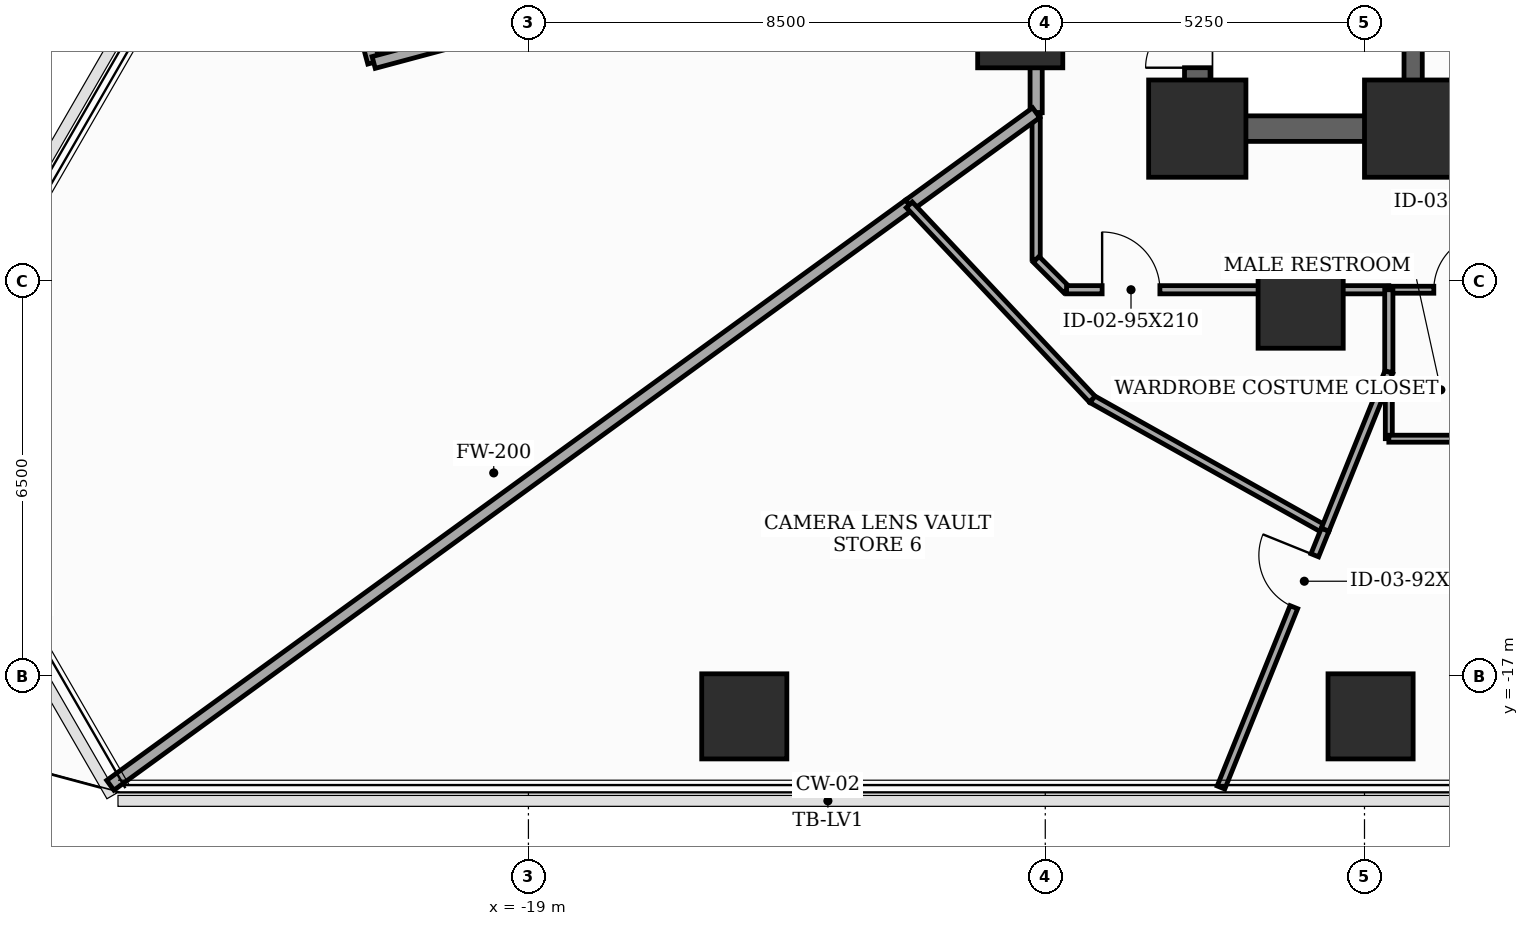
"""IFC4 building model, lengths in metres.
Left out: names, types, materials, properties, quantities, classifications, styles, units other than length and angle.
Written with IfcOpenShell. Run it as: python <this file> out.ifc"""

import sys

from ifc_helpers import new_model, si_unit, direction, frame, frame_2d, origin, origin_2d, place, context, subcontext, project, spatial, rectangle, extrude, element, fill, save


model = new_model("IFC4")
c1 = context("Model", 3, precision=1e-05, world=origin(), true_north=direction((0.0, 1.0)))
c2 = subcontext(c1, "Body", "Model", "MODEL_VIEW")
j1 = project(units=[si_unit("LENGTHUNIT", "METRE"), si_unit("PLANEANGLEUNIT", "RADIAN")], contexts=[c1])
p1 = place(None, origin())
s1 = spatial("IfcSite", under=j1, at=p1, CompositionType="ELEMENT")
p2 = place(p1, origin())
s2 = spatial("IfcBuilding", under=s1, at=p2, CompositionType="ELEMENT")
p3 = place(p2, frame((0.0, 0.0, 44.5)))
s3 = spatial("IfcBuildingStorey", under=s2, at=p3, CompositionType="ELEMENT", Elevation=44.5)
for number, where, z_axis, x_axis in (
    (1, (-8.0, -8.0, 0.0), (0.0, 0.0, 1.0), (1.0, 0.0, 0.0)),
    (2, (-4.45, -8.0, 0.0), (0.0, 0.0, 1.0), (1.0, 0.0, 0.0)),
):
    element("IfcColumn", number, at=place(p3, frame(where, z_axis=z_axis, x_axis=x_axis)), inside=s3, PredefinedType="COLUMN", context=c2, shape_type="SweptSolid", body=[
        extrude(rectangle(XDim=1.6, YDim=1.6, at=origin_2d()), origin(), (0.0, 0.0, 1.0), 3.7),
    ])
for number, where, z_axis, x_axis in (
    (3, (-10.912, -6.3, 0.0), (0.0, 0.0, 1.0), (1.0, 0.0, 0.0)),
    (4, (-6.3, -10.912, 0.0), (0.0, 0.0, 1.0), (1.0, 0.0, 0.0)),
    (5, (-15.45, -17.667, 0.0), (0.0, 0.0, 1.0), (1.0, 0.0, 0.0)),
    (6, (-5.15, -17.667, 0.0), (0.0, 0.0, 1.0), (1.0, 0.0, 0.0)),
):
    element("IfcColumn", number, at=place(p3, frame(where, z_axis=z_axis, x_axis=x_axis)), inside=s3, PredefinedType="COLUMN", context=c2, shape_type="SweptSolid", body=[
        extrude(rectangle(XDim=1.4, YDim=1.4, at=origin_2d()), origin(), (0.0, 0.0, 1.0), 3.7),
    ])
p4 = place(p3, frame((-8.0, -8.0, 0.0), z_axis=(0.0, 0.0, 1.0), x_axis=(0.0, 1.0, 0.0)))
e7 = element("IfcWall", 7, at=p4, inside=s3, PredefinedType="SHEAR", context=c2, shape_type="SweptSolid", body=[
    extrude(rectangle(XDim=16.0, YDim=0.42, at=frame_2d((8.0, 0.0))), origin(), (0.0, 0.0, 1.0), 3.5),
])
p5 = place(p4, frame((1.002, 0.0, 0.0)))
e8 = element("IfcOpeningElement", 8, at=p5, cuts=e7, PredefinedType="OPENING", context=c2, shape_type="SweptSolid", body=[
    extrude(rectangle(XDim=0.85, YDim=2.02, at=frame_2d((0.425, 1.01))), frame((0.0, 0.22, 0.0), z_axis=(0.0, -1.0, 0.0), x_axis=(1.0, 0.0, 0.0)), (0.0, 0.0, 1.0), 0.44),
])
p6 = place(p4, frame((5.35, 0.0, 0.0)))
e9 = element("IfcOpeningElement", 9, at=p6, cuts=e7, PredefinedType="OPENING", context=c2, shape_type="SweptSolid", body=[
    extrude(rectangle(XDim=1.05, YDim=2.15, at=frame_2d((0.525, 1.075))), frame((0.0, 0.22, 0.0), z_axis=(0.0, -1.0, 0.0), x_axis=(1.0, 0.0, 0.0)), (0.0, 0.0, 1.0), 0.44),
])
p7 = place(p3, frame((-8.0, -8.0, 0.0), z_axis=(0.0, 0.0, 1.0), x_axis=(1.0, 0.0, 0.0)))
e10 = element("IfcWall", 10, at=p7, inside=s3, PredefinedType="SHEAR", context=c2, shape_type="SweptSolid", body=[
    extrude(rectangle(XDim=16.0, YDim=0.42, at=frame_2d((8.0, 0.0))), origin(), (0.0, 0.0, 1.0), 3.5),
])
p8 = place(p7, frame((4.6, 0.0, 0.0)))
e11 = element("IfcOpeningElement", 11, at=p8, cuts=e10, PredefinedType="OPENING", context=c2, shape_type="SweptSolid", body=[
    extrude(rectangle(XDim=0.95, YDim=2.1, at=frame_2d((0.475, 1.05))), frame((0.0, 0.22, 0.0), z_axis=(0.0, -1.0, 0.0), x_axis=(1.0, 0.0, 0.0)), (0.0, 0.0, 1.0), 0.44),
])
p9 = place(p7, frame((7.52, 0.0, 0.0)))
e12 = element("IfcOpeningElement", 12, at=p9, cuts=e10, PredefinedType="OPENING", context=c2, shape_type="SweptSolid", body=[
    extrude(rectangle(XDim=0.95, YDim=2.1, at=frame_2d((0.475, 1.05))), frame((0.0, 0.22, 0.0), z_axis=(0.0, -1.0, 0.0), x_axis=(1.0, 0.0, 0.0)), (0.0, 0.0, 1.0), 0.44),
])
p10 = place(p7, frame((10.45, 0.0, 0.0)))
e13 = element("IfcOpeningElement", 13, at=p10, cuts=e10, PredefinedType="OPENING", context=c2, shape_type="SweptSolid", body=[
    extrude(rectangle(XDim=0.95, YDim=2.1, at=frame_2d((0.475, 1.05))), frame((0.0, 0.22, 0.0), z_axis=(0.0, -1.0, 0.0), x_axis=(1.0, 0.0, 0.0)), (0.0, 0.0, 1.0), 0.44),
])
p11 = place(p3, frame((-4.45, -7.79, 0.0), z_axis=(0.0, 0.0, 1.0), x_axis=(0.0, 1.0, 0.0)))
e14 = element("IfcWall", 14, at=p11, inside=s3, PredefinedType="SHEAR", context=c2, shape_type="SweptSolid", body=[
    extrude(rectangle(XDim=15.58, YDim=0.3, at=frame_2d((7.79, 0.0))), origin(), (0.0, 0.0, 1.0), 3.5),
])
p12 = place(p3, frame((-22.115, -4.787, 0.0), z_axis=(0.0, 0.0, 1.0), x_axis=(0.259105843213, -0.965848933329, 0.0)))
e15 = element("IfcWall", 15, at=p12, inside=s3, PredefinedType="SOLIDWALL", context=c2, shape_type="SweptSolid", body=[
    extrude(rectangle(XDim=2.2, YDim=0.2, at=frame_2d((1.1, 0.0))), origin(), (0.0, 0.0, 1.0), 2.935),
])
p13 = place(p3, frame((-21.545, -6.912, 0.0), z_axis=(0.0, 0.0, 1.0), x_axis=(0.965906888357, 0.258889712088, 0.0)))
e16 = element("IfcWall", 16, at=p13, inside=s3, PredefinedType="SOLIDWALL", context=c2, shape_type="SweptSolid", body=[
    extrude(rectangle(XDim=11.28, YDim=0.2, at=frame_2d((5.64, 0.0))), origin(), (0.0, 0.0, 1.0), 2.785),
])
p14 = place(p3, frame((-10.65, -3.992, 0.0), z_axis=(0.0, 0.0, 1.0), x_axis=(0.0, -1.0, 0.0)))
e17 = element("IfcWall", 17, at=p14, inside=s3, PredefinedType="SOLIDWALL", context=c2, shape_type="SweptSolid", body=[
    extrude(rectangle(XDim=3.746, YDim=0.2, at=frame_2d((1.873, 0.0))), origin(), (0.0, 0.0, 1.0), 2.785),
])
p15 = place(p3, frame((-10.65, -7.738, 0.0), z_axis=(0.0, 0.0, 1.0), x_axis=(0.0, -1.0, 0.0)))
e18 = element("IfcWall", 18, at=p15, inside=s3, PredefinedType="PARTITIONING", context=c2, shape_type="SweptSolid", body=[
    extrude(rectangle(XDim=2.412, YDim=0.135, at=frame_2d((1.206, 0.0))), origin(), (0.0, 0.0, 1.0), 3.5),
])
p16 = place(p3, frame((-10.65, -10.15, 0.0), z_axis=(0.0, 0.0, 1.0), x_axis=(0.707106781187, -0.707106781187, 0.0)))
e19 = element("IfcWall", 19, at=p16, inside=s3, PredefinedType="PARTITIONING", context=c2, shape_type="SweptSolid", body=[
    extrude(rectangle(XDim=0.707, YDim=0.135, at=frame_2d((0.354, 0.0))), origin(), (0.0, 0.0, 1.0), 3.5),
])
p17 = place(p3, frame((-10.15, -10.65, 0.0), z_axis=(0.0, 0.0, 1.0), x_axis=(1.0, 0.0, 0.0)))
e20 = element("IfcWall", 20, at=p17, inside=s3, PredefinedType="PARTITIONING", context=c2, shape_type="SweptSolid", body=[
    extrude(rectangle(XDim=5.3, YDim=0.135, at=frame_2d((2.65, 0.0))), origin(), (0.0, 0.0, 1.0), 2.785),
])
p18 = place(p17, frame((0.585, 0.0, 0.0)))
e21 = element("IfcOpeningElement", 21, at=p18, cuts=e20, PredefinedType="OPENING", context=c2, shape_type="SweptSolid", body=[
    extrude(rectangle(XDim=0.95, YDim=2.1, at=frame_2d((0.475, 1.05))), frame((0.0, 0.077, 0.0), z_axis=(0.0, -1.0, 0.0), x_axis=(1.0, 0.0, 0.0)), (0.0, 0.0, 1.0), 0.155),
])
p19 = place(p3, frame((-4.85, -10.65, 0.0), z_axis=(0.0, 0.0, 1.0), x_axis=(1.0, 0.0, 0.0)))
e22 = element("IfcWall", 22, at=p19, inside=s3, PredefinedType="PARTITIONING", context=c2, shape_type="SweptSolid", body=[
    extrude(rectangle(XDim=2.4, YDim=0.115, at=frame_2d((1.2, 0.0))), origin(), (0.0, 0.0, 1.0), 3.5),
])
p20 = place(p19, frame((0.74, 0.0, 0.0)))
e23 = element("IfcOpeningElement", 23, at=p20, cuts=e22, PredefinedType="OPENING", context=c2, shape_type="SweptSolid", body=[
    extrude(rectangle(XDim=0.92, YDim=2.1, at=frame_2d((0.46, 1.05))), frame((0.0, 0.067, 0.0), z_axis=(0.0, -1.0, 0.0), x_axis=(1.0, 0.0, 0.0)), (0.0, 0.0, 1.0), 0.135),
])
p21 = place(p3, frame((-25.876, -18.8, 0.0), z_axis=(0.0, 0.0, 1.0), x_axis=(0.809014839236, 0.587788218575, 0.0)))
e24 = element("IfcWall", 24, at=p21, inside=s3, PredefinedType="SOLIDWALL", context=c2, shape_type="SweptSolid", body=[
    extrude(rectangle(XDim=16.242, YDim=0.2, at=frame_2d((8.121, 0.0))), origin(), (0.0, 0.0, 1.0), 2.935),
])
p22 = place(p3, frame((-12.736, -9.253, 0.0), z_axis=(0.0, 0.0, 1.0), x_axis=(0.809165833136, 0.587580338749, 0.0)))
e25 = element("IfcWall", 25, at=p22, inside=s3, PredefinedType="SOLIDWALL", context=c2, shape_type="SweptSolid", body=[
    extrude(rectangle(XDim=2.578, YDim=0.2, at=frame_2d((1.289, 0.0))), origin(), (0.0, 0.0, 1.0), 3.5),
])
p23 = place(p3, frame((-5.897, -14.596, 0.0), z_axis=(0.0, 0.0, 1.0), x_axis=(-0.87248894478, 0.488633851915, 0.0)))
e26 = element("IfcWall", 26, at=p23, inside=s3, PredefinedType="PARTITIONING", context=c2, shape_type="SweptSolid", body=[
    extrude(rectangle(XDim=4.39, YDim=0.135, at=frame_2d((2.195, 0.0))), origin(), (0.0, 0.0, 1.0), 2.685),
])
p24 = place(p3, frame((-9.727, -12.451, 0.0), z_axis=(0.0, 0.0, 1.0), x_axis=(-0.685262368975, 0.728296289752, 0.0)))
e27 = element("IfcWall", 27, at=p24, inside=s3, PredefinedType="PARTITIONING", context=c2, shape_type="SweptSolid", body=[
    extrude(rectangle(XDim=4.391, YDim=0.135, at=frame_2d((2.196, 0.0))), origin(), (0.0, 0.0, 1.0), 3.5),
])
p25 = place(p3, frame((-7.61, -18.837, 0.0), z_axis=(0.0, 0.0, 1.0), x_axis=(0.374545124537, 0.927208687236, 0.0)))
e28 = element("IfcWall", 28, at=p25, inside=s3, PredefinedType="PARTITIONING", context=c2, shape_type="SweptSolid", body=[
    extrude(rectangle(XDim=4.574, YDim=0.135, at=frame_2d((2.287, 0.0))), origin(), (0.0, 0.0, 1.0), 2.685),
])
p26 = place(p25, frame((3.199, 0.0, 0.0)))
e29 = element("IfcOpeningElement", 29, at=p26, cuts=e28, PredefinedType="OPENING", context=c2, shape_type="SweptSolid", body=[
    extrude(rectangle(XDim=0.92, YDim=2.1, at=frame_2d((0.46, 1.05))), frame((0.0, 0.077, 0.0), z_axis=(0.0, -1.0, 0.0), x_axis=(1.0, 0.0, 0.0)), (0.0, 0.0, 1.0), 0.155),
])
p27 = place(p3, frame((-4.85, -12.004, 0.0), z_axis=(0.0, 0.0, 1.0), x_axis=(0.0, 1.0, 0.0)))
e30 = element("IfcWall", 30, at=p27, inside=s3, PredefinedType="PARTITIONING", context=c2, shape_type="SweptSolid", body=[
    extrude(rectangle(XDim=1.354, YDim=0.135, at=frame_2d((0.677, 0.0))), origin(), (0.0, 0.0, 1.0), 2.785),
])
p28 = place(p3, frame((-5.897, -14.596, 0.0), z_axis=(0.0, 0.0, 1.0), x_axis=(0.374490485533, 0.92723075674, 0.0)))
e31 = element("IfcWall", 31, at=p28, inside=s3, PredefinedType="PARTITIONING", context=c2, shape_type="SweptSolid", body=[
    extrude(rectangle(XDim=2.795, YDim=0.135, at=frame_2d((1.398, 0.0))), origin(), (0.0, 0.0, 1.0), 2.685),
])
p29 = place(p3, frame((-4.85, -12.298, 0.0), z_axis=(0.0, 0.0, 1.0), x_axis=(0.0, -1.0, 0.0)))
e32 = element("IfcWall", 32, at=p29, inside=s3, PredefinedType="PARTITIONING", context=c2, shape_type="SweptSolid", body=[
    extrude(rectangle(XDim=0.802, YDim=0.115, at=frame_2d((0.401, 0.0))), origin(), (0.0, 0.0, 1.0), 3.5),
])
p30 = place(p3, frame((-4.85, -13.1, 0.0), z_axis=(0.0, 0.0, 1.0), x_axis=(1.0, 0.0, 0.0)))
e33 = element("IfcWall", 33, at=p30, inside=s3, PredefinedType="PARTITIONING", context=c2, shape_type="SweptSolid", body=[
    extrude(rectangle(XDim=2.4, YDim=0.115, at=frame_2d((1.2, 0.0))), origin(), (0.0, 0.0, 1.0), 3.5),
])
p31 = place(p5, origin())
e34 = element("IfcDoor", 34, at=p31, inside=s3, OperationType="SINGLE_SWING_LEFT", PredefinedType="TRAPDOOR", context=c2, shape_type="SweptSolid", body=[
    extrude(rectangle(XDim=0.85, YDim=2.02, at=frame_2d((0.425, 1.01))), frame((0.0, 0.025, 0.0), z_axis=(0.0, -1.0, 0.0), x_axis=(1.0, 0.0, 0.0)), (0.0, 0.0, 1.0), 0.05),
])
fill(e8, e34)
p32 = place(p18, origin())
e35 = element("IfcDoor", 35, at=p32, inside=s3, OperationType="SINGLE_SWING_LEFT", PredefinedType="DOOR", context=c2, shape_type="SweptSolid", body=[
    extrude(rectangle(XDim=0.95, YDim=2.1, at=frame_2d((0.475, 1.05))), frame((0.0, 0.025, 0.0), z_axis=(0.0, -1.0, 0.0), x_axis=(1.0, 0.0, 0.0)), (0.0, 0.0, 1.0), 0.05),
])
fill(e21, e35)
p33 = place(p20, origin())
e36 = element("IfcDoor", 36, at=p33, inside=s3, OperationType="SINGLE_SWING_RIGHT", PredefinedType="DOOR", context=c2, shape_type="SweptSolid", body=[
    extrude(rectangle(XDim=0.92, YDim=2.1, at=frame_2d((0.46, 1.05))), frame((0.0, 0.025, 0.0), z_axis=(0.0, -1.0, 0.0), x_axis=(1.0, 0.0, 0.0)), (0.0, 0.0, 1.0), 0.05),
])
fill(e23, e36)
p34 = place(p26, origin())
e37 = element("IfcDoor", 37, at=p34, inside=s3, OperationType="SINGLE_SWING_RIGHT", PredefinedType="DOOR", context=c2, shape_type="SweptSolid", body=[
    extrude(rectangle(XDim=0.92, YDim=2.1, at=frame_2d((0.46, 1.05))), frame((0.0, 0.025, 0.0), z_axis=(0.0, -1.0, 0.0), x_axis=(1.0, 0.0, 0.0)), (0.0, 0.0, 1.0), 0.05),
])
fill(e29, e37)
save(model, sys.argv[1])
